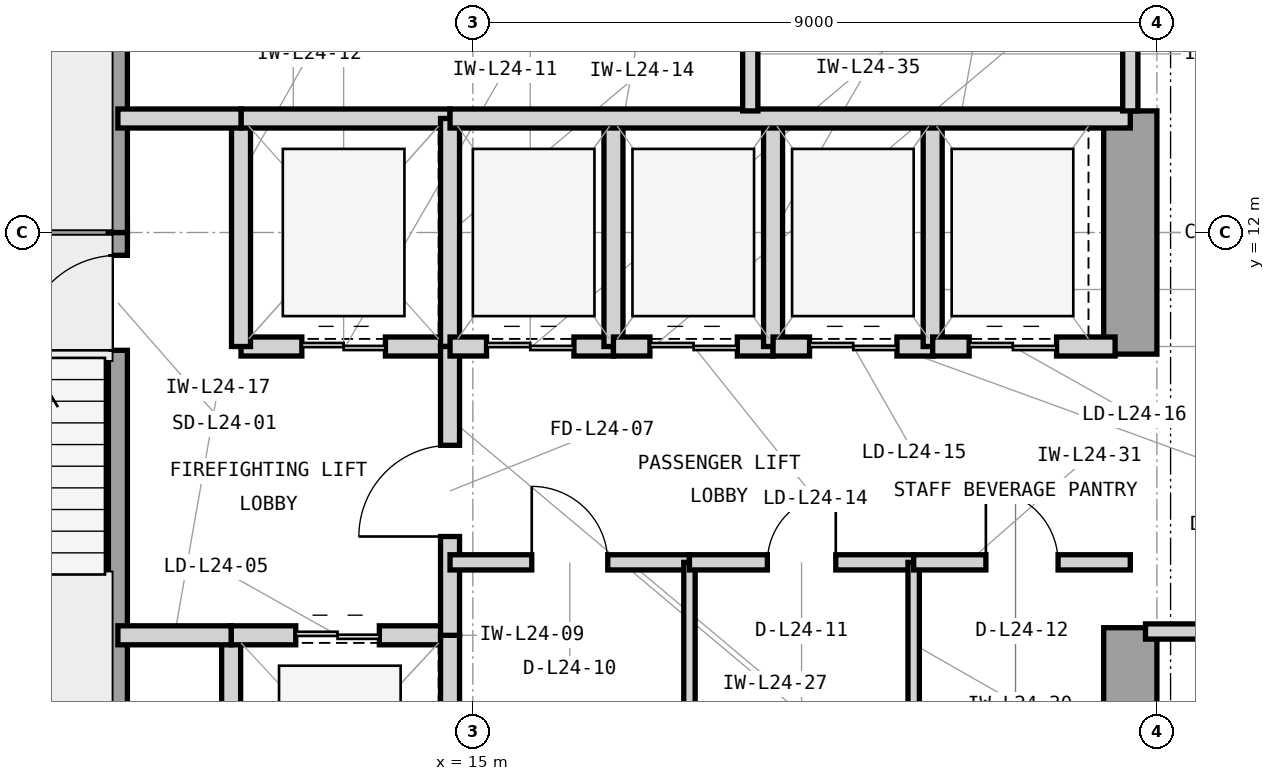
"""IFC4 building model, lengths in metres.
Left out: names, types, materials, properties, quantities, classifications, styles, units other than length and angle.
Written with IfcOpenShell. Run it as: python <this file> out.ifc"""

import sys

from ifc_helpers import new_model, si_unit, direction, frame, frame_2d, origin, place, context, subcontext, project, spatial, rectangle, extrude, element, fill, save


model = new_model("IFC4")
c1 = context("Model", 3, precision=1e-05, world=origin(), true_north=direction((0.0, 1.0)))
c2 = subcontext(c1, "Body", "Model", "MODEL_VIEW")
j1 = project(units=[si_unit("LENGTHUNIT", "METRE"), si_unit("PLANEANGLEUNIT", "RADIAN")], contexts=[c1])
p1 = place(None, origin())
s1 = spatial("IfcSite", under=j1, at=p1, CompositionType="ELEMENT")
p2 = place(p1, origin())
s2 = spatial("IfcBuilding", under=s1, at=p2, CompositionType="ELEMENT")
p3 = place(p2, frame((0.0, 0.0, 105.0)))
s3 = spatial("IfcBuildingStorey", under=s2, at=p3, CompositionType="ELEMENT", Elevation=105.0)
p4 = place(p3, frame((23.65, 3.7, 0.0), z_axis=(0.0, 0.0, 1.0), x_axis=(0.0, 1.0, 0.0)))
e1 = element("IfcWall", 1, at=p4, inside=s3, PredefinedType="SHEAR", context=c2, shape_type="SweptSolid", body=[
    extrude(rectangle(XDim=3.1, YDim=0.7, at=frame_2d((1.55, 0.0))), origin(), (0.0, 0.0, 1.0), 3.9),
])
p5 = place(p3, frame((23.65, 10.4, 0.0), z_axis=(0.0, 0.0, 1.0), x_axis=(0.0, 1.0, 0.0)))
e2 = element("IfcWall", 2, at=p5, inside=s3, PredefinedType="SHEAR", context=c2, shape_type="SweptSolid", body=[
    extrude(rectangle(XDim=3.2, YDim=0.7, at=frame_2d((1.6, 0.0))), origin(), (0.0, 0.0, 1.0), 3.9),
])
p6 = place(p3, frame((6.35, 12.0, 0.0), z_axis=(0.0, 0.0, 1.0), x_axis=(1.0, 0.0, 0.0)))
e3 = element("IfcWall", 3, at=p6, inside=s3, PredefinedType="SHEAR", context=c2, shape_type="SweptSolid", body=[
    extrude(rectangle(XDim=4.105, YDim=0.25, at=frame_2d((2.052, 0.0))), origin(), (0.0, 0.0, 1.0), 3.9),
])
p7 = place(p3, frame((10.33, 4.55, 0.0), z_axis=(0.0, 0.0, 1.0), x_axis=(0.0, 1.0, 0.0)))
e4 = element("IfcWall", 4, at=p7, inside=s3, PredefinedType="SHEAR", context=c2, shape_type="SweptSolid", body=[
    extrude(rectangle(XDim=7.45, YDim=0.25, at=frame_2d((3.725, 0.0))), origin(), (0.0, 0.0, 1.0), 3.9),
])
p8 = place(p7, frame((5.9, 0.0, 0.0)))
e5 = element("IfcOpeningElement", 5, at=p8, cuts=e4, PredefinedType="OPENING", context=c2, shape_type="SweptSolid", body=[
    extrude(rectangle(XDim=1.25, YDim=2.2, at=frame_2d((0.625, 1.1))), frame((0.0, 0.135, 0.0), z_axis=(0.0, -1.0, 0.0), x_axis=(1.0, 0.0, 0.0)), (0.0, 0.0, 1.0), 0.27),
])
p9 = place(p3, frame((10.33, 12.0, 0.0), z_axis=(0.0, 0.0, 1.0), x_axis=(0.0, 1.0, 0.0)))
e6 = element("IfcWall", 6, at=p9, inside=s3, PredefinedType="SHEAR", context=c2, shape_type="SweptSolid", body=[
    extrude(rectangle(XDim=7.45, YDim=0.25, at=frame_2d((3.725, 0.0))), origin(), (0.0, 0.0, 1.0), 3.9),
])
p10 = place(p9, frame((5.85, 0.0, 0.0)))
e7 = element("IfcOpeningElement", 7, at=p10, cuts=e6, PredefinedType="OPENING", context=c2, shape_type="SweptSolid", body=[
    extrude(rectangle(XDim=1.25, YDim=2.2, at=frame_2d((0.625, 1.1))), frame((0.0, 0.135, 0.0), z_axis=(0.0, -1.0, 0.0), x_axis=(1.0, 0.0, 0.0)), (0.0, 0.0, 1.0), 0.27),
])
p11 = place(p3, frame((11.82, 3.35, 0.0), z_axis=(0.0, 0.0, 1.0), x_axis=(0.0, 1.0, 0.0)))
e8 = element("IfcWall", 8, at=p11, inside=s3, PredefinedType="PARTITIONING", context=c2, shape_type="SweptSolid", body=[
    extrude(rectangle(XDim=3.35, YDim=0.25, at=frame_2d((1.675, 0.0))), origin(), (0.0, 0.0, 1.0), 3.69),
])
p12 = place(p3, frame((11.82, 6.7, 0.0), z_axis=(0.0, 0.0, 1.0), x_axis=(1.0, 0.0, 0.0)))
e9 = element("IfcWall", 9, at=p12, inside=s3, PredefinedType="PARTITIONING", context=c2, shape_type="SweptSolid", body=[
    extrude(rectangle(XDim=2.88, YDim=0.25, at=frame_2d((1.44, 0.0))), origin(), (0.0, 0.0, 1.0), 3.227),
])
p13 = place(p12, frame((0.85, 0.0, 0.0)))
e10 = element("IfcOpeningElement", 10, at=p13, cuts=e9, PredefinedType="OPENING", context=c2, shape_type="SweptSolid", body=[
    extrude(rectangle(XDim=1.1, YDim=2.25, at=frame_2d((0.55, 1.125))), frame((0.0, 0.135, 0.0), z_axis=(0.0, -1.0, 0.0), x_axis=(1.0, 0.0, 0.0)), (0.0, 0.0, 1.0), 0.27),
])
p14 = place(p3, frame((14.7, 3.35, 0.0), z_axis=(0.0, 0.0, 1.0), x_axis=(0.0, 1.0, 0.0)))
e11 = element("IfcWall", 11, at=p14, inside=s3, PredefinedType="PARTITIONING", context=c2, shape_type="SweptSolid", body=[
    extrude(rectangle(XDim=3.35, YDim=0.25, at=frame_2d((1.675, 0.0))), origin(), (0.0, 0.0, 1.0), 3.69),
])
p15 = place(p3, frame((11.95, 10.5, 0.0), z_axis=(0.0, 0.0, 1.0), x_axis=(1.0, 0.0, 0.0)))
e12 = element("IfcWall", 12, at=p15, inside=s3, PredefinedType="PARTITIONING", context=c2, shape_type="SweptSolid", body=[
    extrude(rectangle(XDim=2.75, YDim=0.25, at=frame_2d((1.375, 0.0))), origin(), (0.0, 0.0, 1.0), 3.227),
])
p16 = place(p15, frame((0.8, 0.0, 0.0)))
e13 = element("IfcOpeningElement", 13, at=p16, cuts=e12, PredefinedType="OPENING", context=c2, shape_type="SweptSolid", body=[
    extrude(rectangle(XDim=1.1, YDim=2.25, at=frame_2d((0.55, 1.125))), frame((0.0, 0.135, 0.0), z_axis=(0.0, -1.0, 0.0), x_axis=(1.0, 0.0, 0.0)), (0.0, 0.0, 1.0), 0.27),
])
p17 = place(p3, frame((11.95, 10.5, 0.0), z_axis=(0.0, 0.0, 1.0), x_axis=(0.0, 1.0, 0.0)))
e14 = element("IfcWall", 14, at=p17, inside=s3, PredefinedType="PARTITIONING", context=c2, shape_type="SweptSolid", body=[
    extrude(rectangle(XDim=3.0, YDim=0.25, at=frame_2d((1.5, 0.0))), origin(), (0.0, 0.0, 1.0), 3.69),
])
p18 = place(p3, frame((11.95, 13.5, 0.0), z_axis=(0.0, 0.0, 1.0), x_axis=(1.0, 0.0, 0.0)))
e15 = element("IfcWall", 15, at=p18, inside=s3, PredefinedType="PARTITIONING", context=c2, shape_type="SweptSolid", body=[
    extrude(rectangle(XDim=2.75, YDim=0.25, at=frame_2d((1.375, 0.0))), origin(), (0.0, 0.0, 1.0), 3.227),
])
p19 = place(p3, frame((14.7, 10.5, 0.0), z_axis=(0.0, 0.0, 1.0), x_axis=(0.0, 1.0, 0.0)))
e16 = element("IfcWall", 16, at=p19, inside=s3, PredefinedType="PARTITIONING", context=c2, shape_type="SweptSolid", body=[
    extrude(rectangle(XDim=3.0, YDim=0.25, at=frame_2d((1.5, 0.0))), origin(), (0.0, 0.0, 1.0), 3.69),
])
p20 = place(p3, frame((14.7, 6.7, 0.0), z_axis=(0.0, 0.0, 1.0), x_axis=(0.0, 1.0, 0.0)))
e17 = element("IfcWall", 17, at=p20, inside=s3, PredefinedType="PARTITIONING", context=c2, shape_type="SweptSolid", body=[
    extrude(rectangle(XDim=3.8, YDim=0.25, at=frame_2d((1.9, 0.0))), origin(), (0.0, 0.0, 1.0), 3.69),
])
p21 = place(p20, frame((1.3, 0.0, 0.0)))
e18 = element("IfcOpeningElement", 18, at=p21, cuts=e17, PredefinedType="OPENING", context=c2, shape_type="SweptSolid", body=[
    extrude(rectangle(XDim=1.2, YDim=2.2, at=frame_2d((0.6, 1.1))), frame((0.0, 0.135, 0.0), z_axis=(0.0, -1.0, 0.0), x_axis=(1.0, 0.0, 0.0)), (0.0, 0.0, 1.0), 0.27),
])
p22 = place(p3, frame((10.33, 13.5, 0.0), z_axis=(0.0, 0.0, 1.0), x_axis=(1.0, 0.0, 0.0)))
e19 = element("IfcWall", 19, at=p22, inside=s3, PredefinedType="PARTITIONING", context=c2, shape_type="SweptSolid", body=[
    extrude(rectangle(XDim=1.62, YDim=0.25, at=frame_2d((0.81, 0.0))), origin(), (0.0, 0.0, 1.0), 3.227),
])
p23 = place(p3, frame((10.33, 6.7, 0.0), z_axis=(0.0, 0.0, 1.0), x_axis=(1.0, 0.0, 0.0)))
e20 = element("IfcWall", 20, at=p23, inside=s3, PredefinedType="PARTITIONING", context=c2, shape_type="SweptSolid", body=[
    extrude(rectangle(XDim=1.49, YDim=0.25, at=frame_2d((0.745, 0.0))), origin(), (0.0, 0.0, 1.0), 3.227),
])
p24 = place(p3, frame((14.7, 7.66, 0.0), z_axis=(0.0, 0.0, 1.0), x_axis=(1.0, 0.0, 0.0)))
e21 = element("IfcWall", 21, at=p24, inside=s3, PredefinedType="PARTITIONING", context=c2, shape_type="SweptSolid", body=[
    extrude(rectangle(XDim=3.15, YDim=0.2, at=frame_2d((1.575, 0.0))), origin(), (0.0, 0.0, 1.0), 3.69),
])
p25 = place(p24, frame((1.075, 0.0, 0.0)))
e22 = element("IfcOpeningElement", 22, at=p25, cuts=e21, PredefinedType="OPENING", context=c2, shape_type="SweptSolid", body=[
    extrude(rectangle(XDim=1.0, YDim=2.15, at=frame_2d((0.5, 1.075))), frame((0.0, 0.11, 0.0), z_axis=(0.0, -1.0, 0.0), x_axis=(1.0, 0.0, 0.0)), (0.0, 0.0, 1.0), 0.22),
])
p26 = place(p3, frame((17.85, 3.35, 0.0), z_axis=(0.0, 0.0, 1.0), x_axis=(0.0, 1.0, 0.0)))
e23 = element("IfcWall", 23, at=p26, inside=s3, PredefinedType="PARTITIONING", context=c2, shape_type="SweptSolid", body=[
    extrude(rectangle(XDim=4.31, YDim=0.15, at=frame_2d((2.155, 0.0))), origin(), (0.0, 0.0, 1.0), 3.69),
])
p27 = place(p3, frame((17.85, 7.66, 0.0), z_axis=(0.0, 0.0, 1.0), x_axis=(1.0, 0.0, 0.0)))
e24 = element("IfcWall", 24, at=p27, inside=s3, PredefinedType="PARTITIONING", context=c2, shape_type="SweptSolid", body=[
    extrude(rectangle(XDim=2.95, YDim=0.2, at=frame_2d((1.475, 0.0))), origin(), (0.0, 0.0, 1.0), 3.69),
])
p28 = place(p27, frame((1.025, 0.0, 0.0)))
e25 = element("IfcOpeningElement", 25, at=p28, cuts=e24, PredefinedType="OPENING", context=c2, shape_type="SweptSolid", body=[
    extrude(rectangle(XDim=0.9, YDim=2.1, at=frame_2d((0.45, 1.05))), frame((0.0, 0.11, 0.0), z_axis=(0.0, -1.0, 0.0), x_axis=(1.0, 0.0, 0.0)), (0.0, 0.0, 1.0), 0.22),
])
p29 = place(p3, frame((20.8, 3.35, 0.0), z_axis=(0.0, 0.0, 1.0), x_axis=(0.0, 1.0, 0.0)))
e26 = element("IfcWall", 26, at=p29, inside=s3, PredefinedType="PARTITIONING", context=c2, shape_type="SweptSolid", body=[
    extrude(rectangle(XDim=4.31, YDim=0.15, at=frame_2d((2.155, 0.0))), origin(), (0.0, 0.0, 1.0), 3.69),
])
p30 = place(p3, frame((20.8, 7.66, 0.0), z_axis=(0.0, 0.0, 1.0), x_axis=(1.0, 0.0, 0.0)))
e27 = element("IfcWall", 27, at=p30, inside=s3, PredefinedType="PARTITIONING", context=c2, shape_type="SweptSolid", body=[
    extrude(rectangle(XDim=2.85, YDim=0.2, at=frame_2d((1.425, 0.0))), origin(), (0.0, 0.0, 1.0), 3.69),
])
p31 = place(p30, frame((0.95, 0.0, 0.0)))
e28 = element("IfcOpeningElement", 28, at=p31, cuts=e27, PredefinedType="OPENING", context=c2, shape_type="SweptSolid", body=[
    extrude(rectangle(XDim=0.95, YDim=2.1, at=frame_2d((0.475, 1.05))), frame((0.0, 0.11, 0.0), z_axis=(0.0, -1.0, 0.0), x_axis=(1.0, 0.0, 0.0)), (0.0, 0.0, 1.0), 0.22),
])
p32 = place(p3, frame((14.7, 10.5, 0.0), z_axis=(0.0, 0.0, 1.0), x_axis=(1.0, 0.0, 0.0)))
e29 = element("IfcWall", 29, at=p32, inside=s3, PredefinedType="PARTITIONING", context=c2, shape_type="SweptSolid", body=[
    extrude(rectangle(XDim=2.15, YDim=0.25, at=frame_2d((1.075, 0.0))), origin(), (0.0, 0.0, 1.0), 3.227),
])
p33 = place(p32, frame((0.48, 0.0, 0.0)))
e30 = element("IfcOpeningElement", 30, at=p33, cuts=e29, PredefinedType="OPENING", context=c2, shape_type="SweptSolid", body=[
    extrude(rectangle(XDim=1.15, YDim=2.25, at=frame_2d((0.575, 1.125))), frame((0.0, 0.135, 0.0), z_axis=(0.0, -1.0, 0.0), x_axis=(1.0, 0.0, 0.0)), (0.0, 0.0, 1.0), 0.27),
])
p34 = place(p3, frame((16.85, 10.5, 0.0), z_axis=(0.0, 0.0, 1.0), x_axis=(0.0, 1.0, 0.0)))
e31 = element("IfcWall", 31, at=p34, inside=s3, PredefinedType="PARTITIONING", context=c2, shape_type="SweptSolid", body=[
    extrude(rectangle(XDim=3.0, YDim=0.25, at=frame_2d((1.5, 0.0))), origin(), (0.0, 0.0, 1.0), 3.69),
])
p35 = place(p3, frame((16.85, 10.5, 0.0), z_axis=(0.0, 0.0, 1.0), x_axis=(1.0, 0.0, 0.0)))
e32 = element("IfcWall", 32, at=p35, inside=s3, PredefinedType="PARTITIONING", context=c2, shape_type="SweptSolid", body=[
    extrude(rectangle(XDim=2.1, YDim=0.25, at=frame_2d((1.05, 0.0))), origin(), (0.0, 0.0, 1.0), 3.227),
])
p36 = place(p35, frame((0.48, 0.0, 0.0)))
e33 = element("IfcOpeningElement", 33, at=p36, cuts=e32, PredefinedType="OPENING", context=c2, shape_type="SweptSolid", body=[
    extrude(rectangle(XDim=1.15, YDim=2.25, at=frame_2d((0.575, 1.125))), frame((0.0, 0.135, 0.0), z_axis=(0.0, -1.0, 0.0), x_axis=(1.0, 0.0, 0.0)), (0.0, 0.0, 1.0), 0.27),
])
p37 = place(p3, frame((18.95, 10.5, 0.0), z_axis=(0.0, 0.0, 1.0), x_axis=(0.0, 1.0, 0.0)))
e34 = element("IfcWall", 34, at=p37, inside=s3, PredefinedType="PARTITIONING", context=c2, shape_type="SweptSolid", body=[
    extrude(rectangle(XDim=3.0, YDim=0.25, at=frame_2d((1.5, 0.0))), origin(), (0.0, 0.0, 1.0), 3.69),
])
p38 = place(p3, frame((18.95, 10.5, 0.0), z_axis=(0.0, 0.0, 1.0), x_axis=(1.0, 0.0, 0.0)))
e35 = element("IfcWall", 35, at=p38, inside=s3, PredefinedType="PARTITIONING", context=c2, shape_type="SweptSolid", body=[
    extrude(rectangle(XDim=2.1, YDim=0.25, at=frame_2d((1.05, 0.0))), origin(), (0.0, 0.0, 1.0), 3.227),
])
p39 = place(p38, frame((0.48, 0.0, 0.0)))
e36 = element("IfcOpeningElement", 36, at=p39, cuts=e35, PredefinedType="OPENING", context=c2, shape_type="SweptSolid", body=[
    extrude(rectangle(XDim=1.15, YDim=2.25, at=frame_2d((0.575, 1.125))), frame((0.0, 0.135, 0.0), z_axis=(0.0, -1.0, 0.0), x_axis=(1.0, 0.0, 0.0)), (0.0, 0.0, 1.0), 0.27),
])
p40 = place(p3, frame((21.05, 10.5, 0.0), z_axis=(0.0, 0.0, 1.0), x_axis=(0.0, 1.0, 0.0)))
e37 = element("IfcWall", 37, at=p40, inside=s3, PredefinedType="PARTITIONING", context=c2, shape_type="SweptSolid", body=[
    extrude(rectangle(XDim=3.0, YDim=0.25, at=frame_2d((1.5, 0.0))), origin(), (0.0, 0.0, 1.0), 3.69),
])
p41 = place(p3, frame((21.05, 10.5, 0.0), z_axis=(0.0, 0.0, 1.0), x_axis=(1.0, 0.0, 0.0)))
e38 = element("IfcWall", 38, at=p41, inside=s3, PredefinedType="PARTITIONING", context=c2, shape_type="SweptSolid", body=[
    extrude(rectangle(XDim=2.4, YDim=0.25, at=frame_2d((1.2, 0.0))), origin(), (0.0, 0.0, 1.0), 3.227),
])
p42 = place(p41, frame((0.48, 0.0, 0.0)))
e39 = element("IfcOpeningElement", 39, at=p42, cuts=e38, PredefinedType="OPENING", context=c2, shape_type="SweptSolid", body=[
    extrude(rectangle(XDim=1.15, YDim=2.25, at=frame_2d((0.575, 1.125))), frame((0.0, 0.135, 0.0), z_axis=(0.0, -1.0, 0.0), x_axis=(1.0, 0.0, 0.0)), (0.0, 0.0, 1.0), 0.27),
])
p43 = place(p3, frame((14.7, 13.5, 0.0), z_axis=(0.0, 0.0, 1.0), x_axis=(1.0, 0.0, 0.0)))
e40 = element("IfcWall", 40, at=p43, inside=s3, PredefinedType="PARTITIONING", context=c2, shape_type="SweptSolid", body=[
    extrude(rectangle(XDim=8.95, YDim=0.25, at=frame_2d((4.475, 0.0))), origin(), (0.0, 0.0, 1.0), 3.227),
])
p44 = place(p3, frame((18.65, 13.6, 0.0), z_axis=(0.0, 0.0, 1.0), x_axis=(0.0, 1.0, 0.0)))
e41 = element("IfcWall", 41, at=p44, inside=s3, PredefinedType="PARTITIONING", context=c2, shape_type="SweptSolid", body=[
    extrude(rectangle(XDim=3.0, YDim=0.2, at=frame_2d((1.5, 0.0))), origin(), (0.0, 0.0, 1.0), 3.69),
])
p45 = place(p44, frame((1.02, 0.0, 0.0)))
e42 = element("IfcOpeningElement", 42, at=p45, cuts=e41, PredefinedType="OPENING", context=c2, shape_type="SweptSolid", body=[
    extrude(rectangle(XDim=0.95, YDim=2.1, at=frame_2d((0.475, 1.05))), frame((0.0, 0.11, 0.0), z_axis=(0.0, -1.0, 0.0), x_axis=(1.0, 0.0, 0.0)), (0.0, 0.0, 1.0), 0.22),
])
p46 = place(p3, frame((23.65, 13.6, 0.0), z_axis=(0.0, 0.0, 1.0), x_axis=(0.0, 1.0, 0.0)))
e43 = element("IfcWall", 43, at=p46, inside=s3, PredefinedType="PARTITIONING", context=c2, shape_type="SweptSolid", body=[
    extrude(rectangle(XDim=3.0, YDim=0.2, at=frame_2d((1.5, 0.0))), origin(), (0.0, 0.0, 1.0), 3.69),
])
p47 = place(p3, frame((23.85, 6.75, 0.0), z_axis=(0.0, 0.0, 1.0), x_axis=(1.0, 0.0, 0.0)))
e44 = element("IfcWall", 44, at=p47, inside=s3, PredefinedType="PARTITIONING", context=c2, shape_type="SweptSolid", body=[
    extrude(rectangle(XDim=2.85, YDim=0.2, at=frame_2d((1.425, 0.0))), origin(), (0.0, 0.0, 1.0), 3.69),
])
p48 = place(p47, frame((0.7, 0.0, 0.0)))
e45 = element("IfcOpeningElement", 45, at=p48, cuts=e44, PredefinedType="OPENING", context=c2, shape_type="SweptSolid", body=[
    extrude(rectangle(XDim=1.0, YDim=2.15, at=frame_2d((0.5, 1.075))), frame((0.0, 0.11, 0.0), z_axis=(0.0, -1.0, 0.0), x_axis=(1.0, 0.0, 0.0)), (0.0, 0.0, 1.0), 0.22),
])
p49 = place(p8, origin())
e46 = element("IfcDoor", 46, at=p49, inside=s3, OperationType="SINGLE_SWING_LEFT", PredefinedType="DOOR", context=c2, shape_type="SweptSolid", body=[
    extrude(rectangle(XDim=1.25, YDim=2.2, at=frame_2d((0.625, 1.1))), frame((0.0, 0.025, 0.0), z_axis=(0.0, -1.0, 0.0), x_axis=(1.0, 0.0, 0.0)), (0.0, 0.0, 1.0), 0.05),
])
fill(e5, e46)
p50 = place(p13, origin())
e47 = element("IfcDoor", 47, at=p50, inside=s3, OperationType="DOUBLE_DOOR_SLIDING", PredefinedType="DOOR", context=c2, shape_type="SweptSolid", body=[
    extrude(rectangle(XDim=1.1, YDim=2.25, at=frame_2d((0.55, 1.125))), frame((0.0, 0.025, 0.0), z_axis=(0.0, -1.0, 0.0), x_axis=(1.0, 0.0, 0.0)), (0.0, 0.0, 1.0), 0.05),
])
fill(e10, e47)
p51 = place(p16, origin())
e48 = element("IfcDoor", 48, at=p51, inside=s3, OperationType="DOUBLE_DOOR_SLIDING", PredefinedType="DOOR", context=c2, shape_type="SweptSolid", body=[
    extrude(rectangle(XDim=1.1, YDim=2.25, at=frame_2d((0.55, 1.125))), frame((0.0, 0.025, 0.0), z_axis=(0.0, -1.0, 0.0), x_axis=(1.0, 0.0, 0.0)), (0.0, 0.0, 1.0), 0.05),
])
fill(e13, e48)
p52 = place(p21, origin())
e49 = element("IfcDoor", 49, at=p52, inside=s3, OperationType="SINGLE_SWING_LEFT", PredefinedType="DOOR", context=c2, shape_type="SweptSolid", body=[
    extrude(rectangle(XDim=1.2, YDim=2.2, at=frame_2d((0.6, 1.1))), frame((0.0, 0.025, 0.0), z_axis=(0.0, -1.0, 0.0), x_axis=(1.0, 0.0, 0.0)), (0.0, 0.0, 1.0), 0.05),
])
fill(e18, e49)
p53 = place(p25, origin())
e50 = element("IfcDoor", 50, at=p53, inside=s3, OperationType="SINGLE_SWING_LEFT", PredefinedType="DOOR", context=c2, shape_type="SweptSolid", body=[
    extrude(rectangle(XDim=1.0, YDim=2.15, at=frame_2d((0.5, 1.075))), frame((0.0, 0.025, 0.0), z_axis=(0.0, -1.0, 0.0), x_axis=(1.0, 0.0, 0.0)), (0.0, 0.0, 1.0), 0.05),
])
fill(e22, e50)
p54 = place(p28, origin())
e51 = element("IfcDoor", 51, at=p54, inside=s3, OperationType="SINGLE_SWING_RIGHT", PredefinedType="TRAPDOOR", context=c2, shape_type="SweptSolid", body=[
    extrude(rectangle(XDim=0.9, YDim=2.1, at=frame_2d((0.45, 1.05))), frame((0.0, 0.025, 0.0), z_axis=(0.0, -1.0, 0.0), x_axis=(1.0, 0.0, 0.0)), (0.0, 0.0, 1.0), 0.05),
])
fill(e25, e51)
p55 = place(p31, origin())
e52 = element("IfcDoor", 52, at=p55, inside=s3, OperationType="SINGLE_SWING_LEFT", PredefinedType="DOOR", context=c2, shape_type="SweptSolid", body=[
    extrude(rectangle(XDim=0.95, YDim=2.1, at=frame_2d((0.475, 1.05))), frame((0.0, 0.025, 0.0), z_axis=(0.0, -1.0, 0.0), x_axis=(1.0, 0.0, 0.0)), (0.0, 0.0, 1.0), 0.05),
])
fill(e28, e52)
p56 = place(p33, origin())
e53 = element("IfcDoor", 53, at=p56, inside=s3, OperationType="DOUBLE_DOOR_SLIDING", PredefinedType="DOOR", context=c2, shape_type="SweptSolid", body=[
    extrude(rectangle(XDim=1.15, YDim=2.25, at=frame_2d((0.575, 1.125))), frame((0.0, 0.025, 0.0), z_axis=(0.0, -1.0, 0.0), x_axis=(1.0, 0.0, 0.0)), (0.0, 0.0, 1.0), 0.05),
])
fill(e30, e53)
p57 = place(p36, origin())
e54 = element("IfcDoor", 54, at=p57, inside=s3, OperationType="DOUBLE_DOOR_SLIDING", PredefinedType="DOOR", context=c2, shape_type="SweptSolid", body=[
    extrude(rectangle(XDim=1.15, YDim=2.25, at=frame_2d((0.575, 1.125))), frame((0.0, 0.025, 0.0), z_axis=(0.0, -1.0, 0.0), x_axis=(1.0, 0.0, 0.0)), (0.0, 0.0, 1.0), 0.05),
])
fill(e33, e54)
p58 = place(p39, origin())
e55 = element("IfcDoor", 55, at=p58, inside=s3, OperationType="DOUBLE_DOOR_SLIDING", PredefinedType="DOOR", context=c2, shape_type="SweptSolid", body=[
    extrude(rectangle(XDim=1.15, YDim=2.25, at=frame_2d((0.575, 1.125))), frame((0.0, 0.025, 0.0), z_axis=(0.0, -1.0, 0.0), x_axis=(1.0, 0.0, 0.0)), (0.0, 0.0, 1.0), 0.05),
])
fill(e36, e55)
p59 = place(p42, origin())
e56 = element("IfcDoor", 56, at=p59, inside=s3, OperationType="DOUBLE_DOOR_SLIDING", PredefinedType="DOOR", context=c2, shape_type="SweptSolid", body=[
    extrude(rectangle(XDim=1.15, YDim=2.25, at=frame_2d((0.575, 1.125))), frame((0.0, 0.025, 0.0), z_axis=(0.0, -1.0, 0.0), x_axis=(1.0, 0.0, 0.0)), (0.0, 0.0, 1.0), 0.05),
])
fill(e39, e56)
save(model, sys.argv[1])
